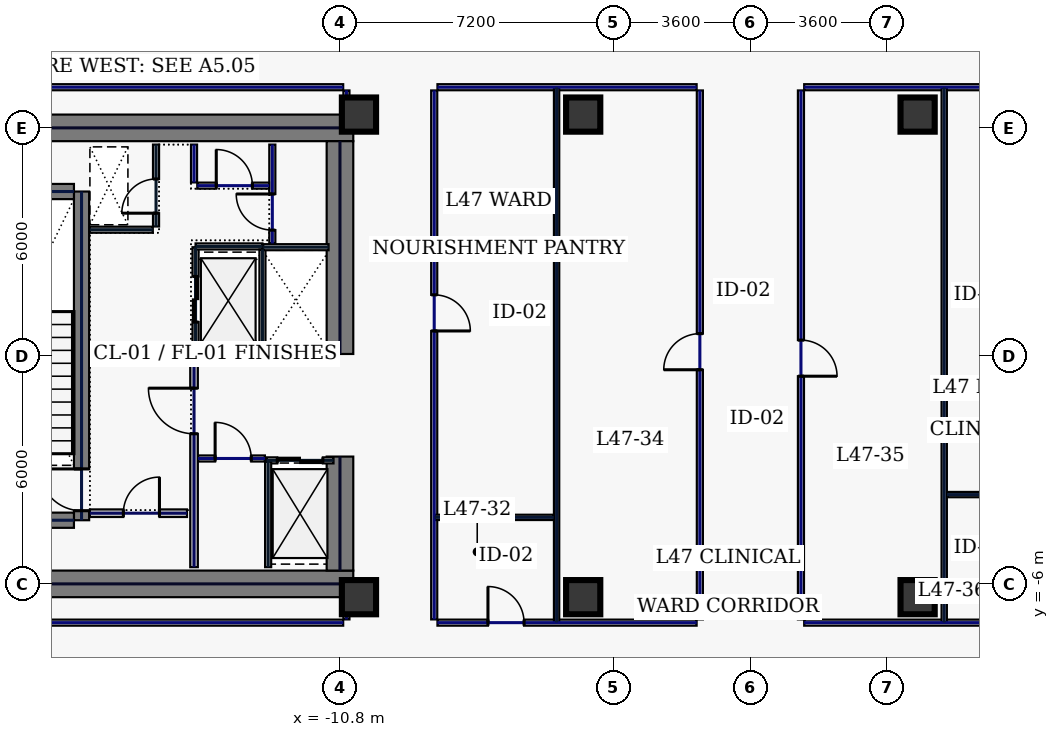
"""IFC4 building model, lengths in metres.
Left out: names, types, materials, properties, quantities, classifications, styles, units other than length and angle.
Written with IfcOpenShell. Run it as: python <this file> out.ifc"""

import sys

from ifc_helpers import new_model, si_unit, direction, frame, frame_2d, origin, origin_2d, place, context, subcontext, project, spatial, rectangle, hollow_rectangle, extrude, element, fill, save


model = new_model("IFC4")
c1 = context("Model", 3, precision=1e-05, world=origin(), true_north=direction((0.0, 1.0)))
c2 = subcontext(c1, "Body", "Model", "MODEL_VIEW")
j1 = project(units=[si_unit("LENGTHUNIT", "METRE"), si_unit("PLANEANGLEUNIT", "RADIAN")], contexts=[c1])
p1 = place(None, origin())
s1 = spatial("IfcSite", under=j1, at=p1, CompositionType="ELEMENT")
p2 = place(p1, origin())
s2 = spatial("IfcBuilding", under=s1, at=p2, CompositionType="ELEMENT")
p3 = place(p2, frame((0.0, 0.0, 204.2)))
s3 = spatial("IfcBuildingStorey", under=s2, at=p3, CompositionType="ELEMENT", Elevation=204.2)
for number, where, z_axis, x_axis in (
    (1, (-22.0, 6.0, 0.0), (0.0, 0.0, 1.0), (1.0, 0.0, 0.0)),
    (2, (-22.0, -6.0, 0.0), (0.0, 0.0, 1.0), (1.0, 0.0, 0.0)),
):
    element("IfcWall", number, at=place(p3, frame(where, z_axis=z_axis, x_axis=x_axis)), inside=s3, PredefinedType="SHEAR", context=c2, shape_type="SweptSolid", body=[
        extrude(rectangle(XDim=11.55, YDim=0.7, at=frame_2d((5.775, 0.0))), origin(), (0.0, 0.0, 1.0), 3.68),
    ])
p4 = place(p3, frame((-10.8, -5.65, 0.0), z_axis=(0.0, 0.0, 1.0), x_axis=(0.0, 1.0, 0.0)))
e3 = element("IfcWall", 3, at=p4, inside=s3, PredefinedType="SHEAR", context=c2, shape_type="SweptSolid", body=[
    extrude(rectangle(XDim=3.0, YDim=0.7, at=frame_2d((1.5, 0.0))), origin(), (0.0, 0.0, 1.0), 3.68),
])
p5 = place(p3, frame((-10.8, 0.05, 0.0), z_axis=(0.0, 0.0, 1.0), x_axis=(0.0, 1.0, 0.0)))
e4 = element("IfcWall", 4, at=p5, inside=s3, PredefinedType="SHEAR", context=c2, shape_type="SweptSolid", body=[
    extrude(rectangle(XDim=5.6, YDim=0.7, at=frame_2d((2.8, 0.0))), origin(), (0.0, 0.0, 1.0), 3.68),
])
p6 = place(p3, frame((-17.6, -4.325, 0.0), z_axis=(0.0, 0.0, 1.0), x_axis=(0.0, 1.0, 0.0)))
e5 = element("IfcWall", 5, at=p6, inside=s3, PredefinedType="SHEAR", context=c2, shape_type="SweptSolid", body=[
    extrude(rectangle(XDim=8.65, YDim=0.4, at=frame_2d((4.325, 0.0))), origin(), (0.0, 0.0, 1.0), 3.68),
])
p7 = place(p6, frame((0.25, 0.0, 0.0)))
e6 = element("IfcOpeningElement", 6, at=p7, cuts=e5, PredefinedType="OPENING", context=c2, shape_type="SweptSolid", body=[
    extrude(rectangle(XDim=1.1, YDim=2.2, at=frame_2d((0.55, 1.1))), frame((0.0, 0.21, 0.0), z_axis=(0.0, -1.0, 0.0), x_axis=(1.0, 0.0, 0.0)), (0.0, 0.0, 1.0), 0.42),
])
for number, where, z_axis, x_axis in (
    (7, (-21.2, -4.325, 0.0), (0.0, 0.0, 1.0), (1.0, 0.0, 0.0)),
    (8, (-21.2, 4.325, 0.0), (0.0, 0.0, 1.0), (1.0, 0.0, 0.0)),
):
    element("IfcWall", number, at=place(p3, frame(where, z_axis=z_axis, x_axis=x_axis)), inside=s3, PredefinedType="SHEAR", context=c2, shape_type="SweptSolid", body=[
        extrude(rectangle(XDim=3.4, YDim=0.4, at=frame_2d((1.7, 0.0))), origin(), (0.0, 0.0, 1.0), 3.68),
    ])
for number, where, z_axis, x_axis in (
    (9, (-10.3, -6.35, 0.0), (0.0, 0.0, 1.0), (1.0, 0.0, 0.0)),
    (10, (-10.3, 6.35, 0.0), (0.0, 0.0, 1.0), (1.0, 0.0, 0.0)),
    (11, (-4.4, -6.35, 0.0), (0.0, 0.0, 1.0), (1.0, 0.0, 0.0)),
    (12, (4.4, -6.35, 0.0), (0.0, 0.0, 1.0), (1.0, 0.0, 0.0)),
    (13, (-4.4, 6.35, 0.0), (0.0, 0.0, 1.0), (1.0, 0.0, 0.0)),
    (14, (4.4, 6.35, 0.0), (0.0, 0.0, 1.0), (1.0, 0.0, 0.0)),
):
    element("IfcColumn", number, at=place(p3, frame(where, z_axis=z_axis, x_axis=x_axis)), inside=s3, PredefinedType="COLUMN", context=c2, shape_type="SweptSolid", body=[
        extrude(hollow_rectangle(XDim=0.9, YDim=0.9, WallThickness=0.04, at=origin_2d()), origin(), (0.0, 0.0, 1.0), 3.68),
    ])
p8 = place(p3, frame((-14.6, 0.12, 0.0), z_axis=(0.0, 0.0, 1.0), x_axis=(0.0, 1.0, 0.0)))
e15 = element("IfcWall", 15, at=p8, inside=s3, PredefinedType="PARTITIONING", context=c2, shape_type="SweptSolid", body=[
    extrude(rectangle(XDim=2.74, YDim=0.16, at=frame_2d((1.37, 0.0))), origin(), (0.0, 0.0, 1.0), 3.68),
])
p9 = place(p8, frame((0.77, 0.0, 0.0)))
e16 = element("IfcOpeningElement", 16, at=p9, cuts=e15, PredefinedType="OPENING", context=c2, shape_type="SweptSolid", body=[
    extrude(rectangle(XDim=1.2, YDim=2.2, at=frame_2d((0.6, 1.1))), frame((0.0, 0.09, 0.0), z_axis=(0.0, -1.0, 0.0), x_axis=(1.0, 0.0, 0.0)), (0.0, 0.0, 1.0), 0.18),
])
for number, where, z_axis, x_axis in (
    (17, (-14.6, 0.1, 0.0), (0.0, 0.0, 1.0), (1.0, 0.0, 0.0)),
    (18, (-14.6, 2.88, 0.0), (0.0, 0.0, 1.0), (1.0, 0.0, 0.0)),
):
    element("IfcWall", number, at=place(p3, frame(where, z_axis=z_axis, x_axis=x_axis)), inside=s3, PredefinedType="PARTITIONING", context=c2, shape_type="SweptSolid", body=[
        extrude(rectangle(XDim=1.76, YDim=0.16, at=frame_2d((0.88, 0.0))), origin(), (0.0, 0.0, 1.0), 3.68),
    ])
p10 = place(p3, frame((-12.84, 0.18, 0.0), z_axis=(0.0, 0.0, 1.0), x_axis=(0.0, 1.0, 0.0)))
e19 = element("IfcWall", 19, at=p10, inside=s3, PredefinedType="PARTITIONING", context=c2, shape_type="SweptSolid", body=[
    extrude(rectangle(XDim=2.62, YDim=0.16, at=frame_2d((1.31, 0.0))), origin(), (0.0, 0.0, 1.0), 3.68),
])
p11 = place(p3, frame((-12.73, -2.75, 0.0), z_axis=(0.0, 0.0, 1.0), x_axis=(1.0, 0.0, 0.0)))
e20 = element("IfcWall", 20, at=p11, inside=s3, PredefinedType="PARTITIONING", context=c2, shape_type="SweptSolid", body=[
    extrude(rectangle(XDim=1.76, YDim=0.16, at=frame_2d((0.88, 0.0))), origin(), (0.0, 0.0, 1.0), 3.68),
])
p12 = place(p11, frame((0.28, 0.0, 0.0)))
e21 = element("IfcOpeningElement", 21, at=p12, cuts=e20, PredefinedType="OPENING", context=c2, shape_type="SweptSolid", body=[
    extrude(rectangle(XDim=1.2, YDim=2.2, at=frame_2d((0.6, 1.1))), frame((0.0, 0.09, 0.0), z_axis=(0.0, -1.0, 0.0), x_axis=(1.0, 0.0, 0.0)), (0.0, 0.0, 1.0), 0.18),
])
for number, where, z_axis, x_axis in (
    (22, (-12.82, 0.06, 0.0), (0.0, 0.0, 1.0), (1.0, 0.0, 0.0)),
    (23, (-12.82, 2.86, 0.0), (0.0, 0.0, 1.0), (1.0, 0.0, 0.0)),
):
    element("IfcWall", number, at=place(p3, frame(where, z_axis=z_axis, x_axis=x_axis)), inside=s3, PredefinedType="PARTITIONING", context=c2, shape_type="SweptSolid", body=[
        extrude(rectangle(XDim=1.72, YDim=0.16, at=frame_2d((0.86, 0.0))), origin(), (0.0, 0.0, 1.0), 3.68),
    ])
p13 = place(p3, frame((-15.64, 3.405, 0.0), z_axis=(0.0, 0.0, 1.0), x_axis=(0.0, 1.0, 0.0)))
e24 = element("IfcWall", 24, at=p13, inside=s3, PredefinedType="PARTITIONING", context=c2, shape_type="SweptSolid", body=[
    extrude(rectangle(XDim=2.155, YDim=0.16, at=frame_2d((1.078, 0.0))), origin(), (0.0, 0.0, 1.0), 3.68),
])
p14 = place(p13, frame((0.35, 0.0, 0.0)))
e25 = element("IfcOpeningElement", 25, at=p14, cuts=e24, PredefinedType="OPENING", context=c2, shape_type="SweptSolid", body=[
    extrude(rectangle(XDim=0.9, YDim=2.2, at=frame_2d((0.45, 1.1))), frame((0.0, 0.09, 0.0), z_axis=(0.0, -1.0, 0.0), x_axis=(1.0, 0.0, 0.0)), (0.0, 0.0, 1.0), 0.18),
])
p15 = place(p3, frame((-17.38, 3.32, 0.0), z_axis=(0.0, 0.0, 1.0), x_axis=(1.0, 0.0, 0.0)))
e26 = element("IfcWall", 26, at=p15, inside=s3, PredefinedType="PARTITIONING", context=c2, shape_type="SweptSolid", body=[
    extrude(rectangle(XDim=1.655, YDim=0.16, at=frame_2d((0.827, 0.0))), origin(), (0.0, 0.0, 1.0), 3.68),
])
p16 = place(p3, frame((-17.38, -4.14, 0.0), z_axis=(0.0, 0.0, 1.0), x_axis=(1.0, 0.0, 0.0)))
e27 = element("IfcWall", 27, at=p16, inside=s3, PredefinedType="SOLIDWALL", context=c2, shape_type="SweptSolid", body=[
    extrude(rectangle(XDim=2.555, YDim=0.2, at=frame_2d((1.277, 0.0))), origin(), (0.0, 0.0, 1.0), 3.68),
])
p17 = place(p16, frame((0.88, 0.0, 0.0)))
e28 = element("IfcOpeningElement", 28, at=p17, cuts=e27, PredefinedType="OPENING", context=c2, shape_type="SweptSolid", body=[
    extrude(rectangle(XDim=0.95, YDim=2.2, at=frame_2d((0.475, 1.1))), frame((0.0, 0.11, 0.0), z_axis=(0.0, -1.0, 0.0), x_axis=(1.0, 0.0, 0.0)), (0.0, 0.0, 1.0), 0.22),
])
p18 = place(p3, frame((-14.535, -2.7, 0.0), z_axis=(0.0, 0.0, 1.0), x_axis=(1.0, 0.0, 0.0)))
e29 = element("IfcWall", 29, at=p18, inside=s3, PredefinedType="PARTITIONING", context=c2, shape_type="SweptSolid", body=[
    extrude(rectangle(XDim=1.76, YDim=0.16, at=frame_2d((0.88, 0.0))), origin(), (0.0, 0.0, 1.0), 3.68),
])
p19 = place(p18, frame((0.45, 0.0, 0.0)))
e30 = element("IfcOpeningElement", 30, at=p19, cuts=e29, PredefinedType="OPENING", context=c2, shape_type="SweptSolid", body=[
    extrude(rectangle(XDim=0.95, YDim=2.2, at=frame_2d((0.475, 1.1))), frame((0.0, 0.09, 0.0), z_axis=(0.0, -1.0, 0.0), x_axis=(1.0, 0.0, 0.0)), (0.0, 0.0, 1.0), 0.18),
])
p20 = place(p3, frame((-12.69, -5.56, 0.0), z_axis=(0.0, 0.0, 1.0), x_axis=(0.0, 1.0, 0.0)))
e31 = element("IfcWall", 31, at=p20, inside=s3, PredefinedType="PARTITIONING", context=c2, shape_type="SweptSolid", body=[
    extrude(rectangle(XDim=2.775, YDim=0.16, at=frame_2d((1.388, 0.0))), origin(), (0.0, 0.0, 1.0), 3.68),
])
p21 = place(p3, frame((-12.58, 2.96, 0.0), z_axis=(0.0, 0.0, 1.0), x_axis=(0.0, 1.0, 0.0)))
e32 = element("IfcWall", 32, at=p21, inside=s3, PredefinedType="PARTITIONING", context=c2, shape_type="SweptSolid", body=[
    extrude(rectangle(XDim=2.6, YDim=0.16, at=frame_2d((1.3, 0.0))), origin(), (0.0, 0.0, 1.0), 3.68),
])
p22 = place(p21, frame((0.35, 0.0, 0.0)))
e33 = element("IfcOpeningElement", 33, at=p22, cuts=e32, PredefinedType="OPENING", context=c2, shape_type="SweptSolid", body=[
    extrude(rectangle(XDim=0.95, YDim=2.2, at=frame_2d((0.475, 1.1))), frame((0.0, 0.09, 0.0), z_axis=(0.0, -1.0, 0.0), x_axis=(1.0, 0.0, 0.0)), (0.0, 0.0, 1.0), 0.18),
])
p23 = place(p3, frame((-14.555, 4.48, 0.0), z_axis=(0.0, 0.0, 1.0), x_axis=(1.0, 0.0, 0.0)))
e34 = element("IfcWall", 34, at=p23, inside=s3, PredefinedType="PARTITIONING", context=c2, shape_type="SweptSolid", body=[
    extrude(rectangle(XDim=1.89, YDim=0.16, at=frame_2d((0.945, 0.0))), origin(), (0.0, 0.0, 1.0), 3.68),
])
p24 = place(p23, frame((0.5, 0.0, 0.0)))
e35 = element("IfcOpeningElement", 35, at=p24, cuts=e34, PredefinedType="OPENING", context=c2, shape_type="SweptSolid", body=[
    extrude(rectangle(XDim=0.95, YDim=2.2, at=frame_2d((0.475, 1.1))), frame((0.0, 0.09, 0.0), z_axis=(0.0, -1.0, 0.0), x_axis=(1.0, 0.0, 0.0)), (0.0, 0.0, 1.0), 0.18),
])
p25 = place(p3, frame((-14.64, 4.565, 0.0), z_axis=(0.0, 0.0, 1.0), x_axis=(0.0, 1.0, 0.0)))
e36 = element("IfcWall", 36, at=p25, inside=s3, PredefinedType="PARTITIONING", context=c2, shape_type="SweptSolid", body=[
    extrude(rectangle(XDim=0.995, YDim=0.16, at=frame_2d((0.498, 0.0))), origin(), (0.0, 0.0, 1.0), 3.68),
])
p26 = place(p3, frame((-14.64, -5.56, 0.0), z_axis=(0.0, 0.0, 1.0), x_axis=(0.0, 1.0, 0.0)))
e37 = element("IfcWall", 37, at=p26, inside=s3, PredefinedType="SOLIDWALL", context=c2, shape_type="SweptSolid", body=[
    extrude(rectangle(XDim=5.6, YDim=0.2, at=frame_2d((2.8, 0.0))), origin(), (0.0, 0.0, 1.0), 3.68),
])
p27 = place(p26, frame((3.51, 0.0, 0.0)))
e38 = element("IfcOpeningElement", 38, at=p27, cuts=e37, PredefinedType="OPENING", context=c2, shape_type="SweptSolid", body=[
    extrude(rectangle(XDim=1.2, YDim=2.2, at=frame_2d((0.6, 1.1))), frame((0.0, 0.11, 0.0), z_axis=(0.0, -1.0, 0.0), x_axis=(1.0, 0.0, 0.0)), (0.0, 0.0, 1.0), 0.22),
])
p28 = place(p3, frame((-22.735, -7.02, 0.0), z_axis=(0.0, 0.0, 1.0), x_axis=(1.0, 0.0, 0.0)))
e39 = element("IfcWall", 39, at=p28, inside=s3, PredefinedType="PARTITIONING", context=c2, shape_type="SweptSolid", body=[
    extrude(rectangle(XDim=12.02, YDim=0.16, at=frame_2d((6.01, 0.0))), origin(), (0.0, 0.0, 1.0), 3.68),
])
p29 = place(p3, frame((-10.63, -6.935, 0.0), z_axis=(0.0, 0.0, 1.0), x_axis=(0.0, 1.0, 0.0)))
e40 = element("IfcWall", 40, at=p29, inside=s3, PredefinedType="PARTITIONING", context=c2, shape_type="SweptSolid", body=[
    extrude(rectangle(XDim=0.515, YDim=0.16, at=frame_2d((0.258, 0.0))), origin(), (0.0, 0.0, 1.0), 1.475),
])
p30 = place(p3, frame((-10.63, 6.42, 0.0), z_axis=(0.0, 0.0, 1.0), x_axis=(0.0, 1.0, 0.0)))
e41 = element("IfcWall", 41, at=p30, inside=s3, PredefinedType="PARTITIONING", context=c2, shape_type="SweptSolid", body=[
    extrude(rectangle(XDim=0.565, YDim=0.16, at=frame_2d((0.283, 0.0))), origin(), (0.0, 0.0, 1.0), 3.68),
])
p31 = place(p3, frame((-10.715, 7.07, 0.0), z_axis=(0.0, 0.0, 1.0), x_axis=(-1.0, 0.0, 0.0)))
e42 = element("IfcWall", 42, at=p31, inside=s3, PredefinedType="PARTITIONING", context=c2, shape_type="SweptSolid", body=[
    extrude(rectangle(XDim=12.02, YDim=0.16, at=frame_2d((6.01, 0.0))), origin(), (0.0, 0.0, 1.0), 3.68),
])
p32 = place(p3, frame((8.235, 7.07, 0.0), z_axis=(0.0, 0.0, 1.0), x_axis=(-1.0, 0.0, 0.0)))
e43 = element("IfcWall", 43, at=p32, inside=s3, PredefinedType="PARTITIONING", context=c2, shape_type="SweptSolid", body=[
    extrude(rectangle(XDim=6.82, YDim=0.16, at=frame_2d((3.41, 0.0))), origin(), (0.0, 0.0, 1.0), 3.68),
])
p33 = place(p3, frame((1.33, 6.985, 0.0), z_axis=(0.0, 0.0, 1.0), x_axis=(0.0, -1.0, 0.0)))
e44 = element("IfcWall", 44, at=p33, inside=s3, PredefinedType="PARTITIONING", context=c2, shape_type="SweptSolid", body=[
    extrude(rectangle(XDim=13.92, YDim=0.16, at=frame_2d((6.96, 0.0))), origin(), (0.0, 0.0, 1.0), 3.68),
])
p34 = place(p33, frame((6.57, 0.0, 0.0)))
e45 = element("IfcOpeningElement", 45, at=p34, cuts=e44, PredefinedType="OPENING", context=c2, shape_type="SweptSolid", body=[
    extrude(rectangle(XDim=0.95, YDim=2.2, at=frame_2d((0.475, 1.1))), frame((0.0, 0.09, 0.0), z_axis=(0.0, -1.0, 0.0), x_axis=(1.0, 0.0, 0.0)), (0.0, 0.0, 1.0), 0.18),
])
p35 = place(p3, frame((1.415, -7.02, 0.0), z_axis=(0.0, 0.0, 1.0), x_axis=(1.0, 0.0, 0.0)))
e46 = element("IfcWall", 46, at=p35, inside=s3, PredefinedType="PARTITIONING", context=c2, shape_type="SweptSolid", body=[
    extrude(rectangle(XDim=6.82, YDim=0.16, at=frame_2d((3.41, 0.0))), origin(), (0.0, 0.0, 1.0), 3.68),
])
p36 = place(p3, frame((-1.33, -6.935, 0.0), z_axis=(0.0, 0.0, 1.0), x_axis=(0.0, 1.0, 0.0)))
e47 = element("IfcWall", 47, at=p36, inside=s3, PredefinedType="PARTITIONING", context=c2, shape_type="SweptSolid", body=[
    extrude(rectangle(XDim=13.92, YDim=0.16, at=frame_2d((6.96, 0.0))), origin(), (0.0, 0.0, 1.0), 3.68),
])
p37 = place(p36, frame((6.57, 0.0, 0.0)))
e48 = element("IfcOpeningElement", 48, at=p37, cuts=e47, PredefinedType="OPENING", context=c2, shape_type="SweptSolid", body=[
    extrude(rectangle(XDim=0.95, YDim=2.2, at=frame_2d((0.475, 1.1))), frame((0.0, 0.09, 0.0), z_axis=(0.0, -1.0, 0.0), x_axis=(1.0, 0.0, 0.0)), (0.0, 0.0, 1.0), 0.18),
])
p38 = place(p3, frame((-1.415, 7.07, 0.0), z_axis=(0.0, 0.0, 1.0), x_axis=(-1.0, 0.0, 0.0)))
e49 = element("IfcWall", 49, at=p38, inside=s3, PredefinedType="PARTITIONING", context=c2, shape_type="SweptSolid", body=[
    extrude(rectangle(XDim=6.82, YDim=0.16, at=frame_2d((3.41, 0.0))), origin(), (0.0, 0.0, 1.0), 3.68),
])
p39 = place(p3, frame((-8.32, 6.985, 0.0), z_axis=(0.0, 0.0, 1.0), x_axis=(0.0, -1.0, 0.0)))
e50 = element("IfcWall", 50, at=p39, inside=s3, PredefinedType="PARTITIONING", context=c2, shape_type="SweptSolid", body=[
    extrude(rectangle(XDim=13.92, YDim=0.16, at=frame_2d((6.96, 0.0))), origin(), (0.0, 0.0, 1.0), 3.68),
])
p40 = place(p39, frame((5.379, 0.0, 0.0)))
e51 = element("IfcOpeningElement", 51, at=p40, cuts=e50, PredefinedType="OPENING", context=c2, shape_type="SweptSolid", body=[
    extrude(rectangle(XDim=0.95, YDim=2.2, at=frame_2d((0.475, 1.1))), frame((0.0, 0.09, 0.0), z_axis=(0.0, -1.0, 0.0), x_axis=(1.0, 0.0, 0.0)), (0.0, 0.0, 1.0), 0.18),
])
p41 = place(p3, frame((-8.235, -7.02, 0.0), z_axis=(0.0, 0.0, 1.0), x_axis=(1.0, 0.0, 0.0)))
e52 = element("IfcWall", 52, at=p41, inside=s3, PredefinedType="PARTITIONING", context=c2, shape_type="SweptSolid", body=[
    extrude(rectangle(XDim=6.82, YDim=0.16, at=frame_2d((3.41, 0.0))), origin(), (0.0, 0.0, 1.0), 3.68),
])
p42 = place(p41, frame((1.329, 0.0, 0.0)))
e53 = element("IfcOpeningElement", 53, at=p42, cuts=e52, PredefinedType="OPENING", context=c2, shape_type="SweptSolid", body=[
    extrude(rectangle(XDim=0.95, YDim=2.2, at=frame_2d((0.475, 1.1))), frame((0.0, 0.09, 0.0), z_axis=(0.0, -1.0, 0.0), x_axis=(1.0, 0.0, 0.0)), (0.0, 0.0, 1.0), 0.18),
])
for number, where, z_axis, x_axis in (
    (54, (-5.1, -7.015, 0.0), (0.0, 0.0, 1.0), (0.0, 1.0, 0.0)),
    (55, (5.1, -7.015, 0.0), (0.0, 0.0, 1.0), (0.0, 1.0, 0.0)),
):
    element("IfcWall", number, at=place(p3, frame(where, z_axis=z_axis, x_axis=x_axis)), inside=s3, PredefinedType="PARTITIONING", context=c2, shape_type="SweptSolid", body=[
        extrude(rectangle(XDim=14.08, YDim=0.14, at=frame_2d((7.04, 0.0))), origin(), (0.0, 0.0, 1.0), 3.68),
    ])
for number, where, z_axis, x_axis in (
    (56, (-8.315, -4.25, 0.0), (0.0, 0.0, 1.0), (1.0, 0.0, 0.0)),
    (57, (5.175, -3.65, 0.0), (0.0, 0.0, 1.0), (1.0, 0.0, 0.0)),
):
    element("IfcWall", number, at=place(p3, frame(where, z_axis=z_axis, x_axis=x_axis)), inside=s3, PredefinedType="PARTITIONING", context=c2, shape_type="SweptSolid", body=[
        extrude(rectangle(XDim=3.14, YDim=0.14, at=frame_2d((1.57, 0.0))), origin(), (0.0, 0.0, 1.0), 3.68),
    ])
p43 = place(p7, origin())
e58 = element("IfcDoor", 58, at=p43, inside=s3, OperationType="SINGLE_SWING_RIGHT", PredefinedType="DOOR", context=c2, shape_type="SweptSolid", body=[
    extrude(rectangle(XDim=1.1, YDim=2.2, at=frame_2d((0.55, 1.1))), frame((0.0, 0.025, 0.0), z_axis=(0.0, -1.0, 0.0), x_axis=(1.0, 0.0, 0.0)), (0.0, 0.0, 1.0), 0.05),
])
fill(e6, e58)
p44 = place(p9, origin())
e59 = element("IfcDoor", 59, at=p44, inside=s3, OperationType="SLIDING_TO_LEFT", PredefinedType="DOOR", context=c2, shape_type="SweptSolid", body=[
    extrude(rectangle(XDim=1.2, YDim=2.2, at=frame_2d((0.6, 1.1))), frame((0.0, 0.025, 0.0), z_axis=(0.0, -1.0, 0.0), x_axis=(1.0, 0.0, 0.0)), (0.0, 0.0, 1.0), 0.05),
])
fill(e16, e59)
p45 = place(p12, origin())
e60 = element("IfcDoor", 60, at=p45, inside=s3, OperationType="SLIDING_TO_LEFT", PredefinedType="DOOR", context=c2, shape_type="SweptSolid", body=[
    extrude(rectangle(XDim=1.2, YDim=2.2, at=frame_2d((0.6, 1.1))), frame((0.0, 0.025, 0.0), z_axis=(0.0, -1.0, 0.0), x_axis=(1.0, 0.0, 0.0)), (0.0, 0.0, 1.0), 0.05),
])
fill(e21, e60)
p46 = place(p14, origin())
e61 = element("IfcDoor", 61, at=p46, inside=s3, OperationType="SINGLE_SWING_LEFT", PredefinedType="DOOR", context=c2, shape_type="SweptSolid", body=[
    extrude(rectangle(XDim=0.9, YDim=2.2, at=frame_2d((0.45, 1.1))), frame((0.0, 0.025, 0.0), z_axis=(0.0, -1.0, 0.0), x_axis=(1.0, 0.0, 0.0)), (0.0, 0.0, 1.0), 0.05),
])
fill(e25, e61)
p47 = place(p17, origin())
e62 = element("IfcDoor", 62, at=p47, inside=s3, OperationType="SINGLE_SWING_RIGHT", PredefinedType="DOOR", context=c2, shape_type="SweptSolid", body=[
    extrude(rectangle(XDim=0.95, YDim=2.2, at=frame_2d((0.475, 1.1))), frame((0.0, 0.025, 0.0), z_axis=(0.0, -1.0, 0.0), x_axis=(1.0, 0.0, 0.0)), (0.0, 0.0, 1.0), 0.05),
])
fill(e28, e62)
p48 = place(p19, origin())
e63 = element("IfcDoor", 63, at=p48, inside=s3, OperationType="SINGLE_SWING_LEFT", PredefinedType="DOOR", context=c2, shape_type="SweptSolid", body=[
    extrude(rectangle(XDim=0.95, YDim=2.2, at=frame_2d((0.475, 1.1))), frame((0.0, 0.025, 0.0), z_axis=(0.0, -1.0, 0.0), x_axis=(1.0, 0.0, 0.0)), (0.0, 0.0, 1.0), 0.05),
])
fill(e30, e63)
p49 = place(p22, origin())
e64 = element("IfcDoor", 64, at=p49, inside=s3, OperationType="SINGLE_SWING_RIGHT", PredefinedType="DOOR", context=c2, shape_type="SweptSolid", body=[
    extrude(rectangle(XDim=0.95, YDim=2.2, at=frame_2d((0.475, 1.1))), frame((0.0, 0.025, 0.0), z_axis=(0.0, -1.0, 0.0), x_axis=(1.0, 0.0, 0.0)), (0.0, 0.0, 1.0), 0.05),
])
fill(e33, e64)
p50 = place(p24, origin())
e65 = element("IfcDoor", 65, at=p50, inside=s3, OperationType="SINGLE_SWING_LEFT", PredefinedType="DOOR", context=c2, shape_type="SweptSolid", body=[
    extrude(rectangle(XDim=0.95, YDim=2.2, at=frame_2d((0.475, 1.1))), frame((0.0, 0.025, 0.0), z_axis=(0.0, -1.0, 0.0), x_axis=(1.0, 0.0, 0.0)), (0.0, 0.0, 1.0), 0.05),
])
fill(e35, e65)
p51 = place(p27, origin())
e66 = element("IfcDoor", 66, at=p51, inside=s3, OperationType="SINGLE_SWING_RIGHT", PredefinedType="DOOR", context=c2, shape_type="SweptSolid", body=[
    extrude(rectangle(XDim=1.2, YDim=2.2, at=frame_2d((0.6, 1.1))), frame((0.0, 0.025, 0.0), z_axis=(0.0, -1.0, 0.0), x_axis=(1.0, 0.0, 0.0)), (0.0, 0.0, 1.0), 0.05),
])
fill(e38, e66)
p52 = place(p42, origin())
e67 = element("IfcDoor", 67, at=p52, inside=s3, OperationType="SINGLE_SWING_LEFT", PredefinedType="DOOR", context=c2, shape_type="SweptSolid", body=[
    extrude(rectangle(XDim=0.95, YDim=2.2, at=frame_2d((0.475, 1.1))), frame((0.0, 0.025, 0.0), z_axis=(0.0, -1.0, 0.0), x_axis=(1.0, 0.0, 0.0)), (0.0, 0.0, 1.0), 0.05),
])
fill(e53, e67)
p53 = place(p40, origin())
e68 = element("IfcDoor", 68, at=p53, inside=s3, OperationType="SINGLE_SWING_RIGHT", PredefinedType="DOOR", context=c2, shape_type="SweptSolid", body=[
    extrude(rectangle(XDim=0.95, YDim=2.2, at=frame_2d((0.475, 1.1))), frame((0.0, 0.025, 0.0), z_axis=(0.0, -1.0, 0.0), x_axis=(1.0, 0.0, 0.0)), (0.0, 0.0, 1.0), 0.05),
])
fill(e51, e68)
p54 = place(p37, origin())
e69 = element("IfcDoor", 69, at=p54, inside=s3, OperationType="SINGLE_SWING_LEFT", PredefinedType="DOOR", context=c2, shape_type="SweptSolid", body=[
    extrude(rectangle(XDim=0.95, YDim=2.2, at=frame_2d((0.475, 1.1))), frame((0.0, 0.025, 0.0), z_axis=(0.0, -1.0, 0.0), x_axis=(1.0, 0.0, 0.0)), (0.0, 0.0, 1.0), 0.05),
])
fill(e48, e69)
p55 = place(p34, origin())
e70 = element("IfcDoor", 70, at=p55, inside=s3, OperationType="SINGLE_SWING_RIGHT", PredefinedType="DOOR", context=c2, shape_type="SweptSolid", body=[
    extrude(rectangle(XDim=0.95, YDim=2.2, at=frame_2d((0.475, 1.1))), frame((0.0, 0.025, 0.0), z_axis=(0.0, -1.0, 0.0), x_axis=(1.0, 0.0, 0.0)), (0.0, 0.0, 1.0), 0.05),
])
fill(e45, e70)
save(model, sys.argv[1])
